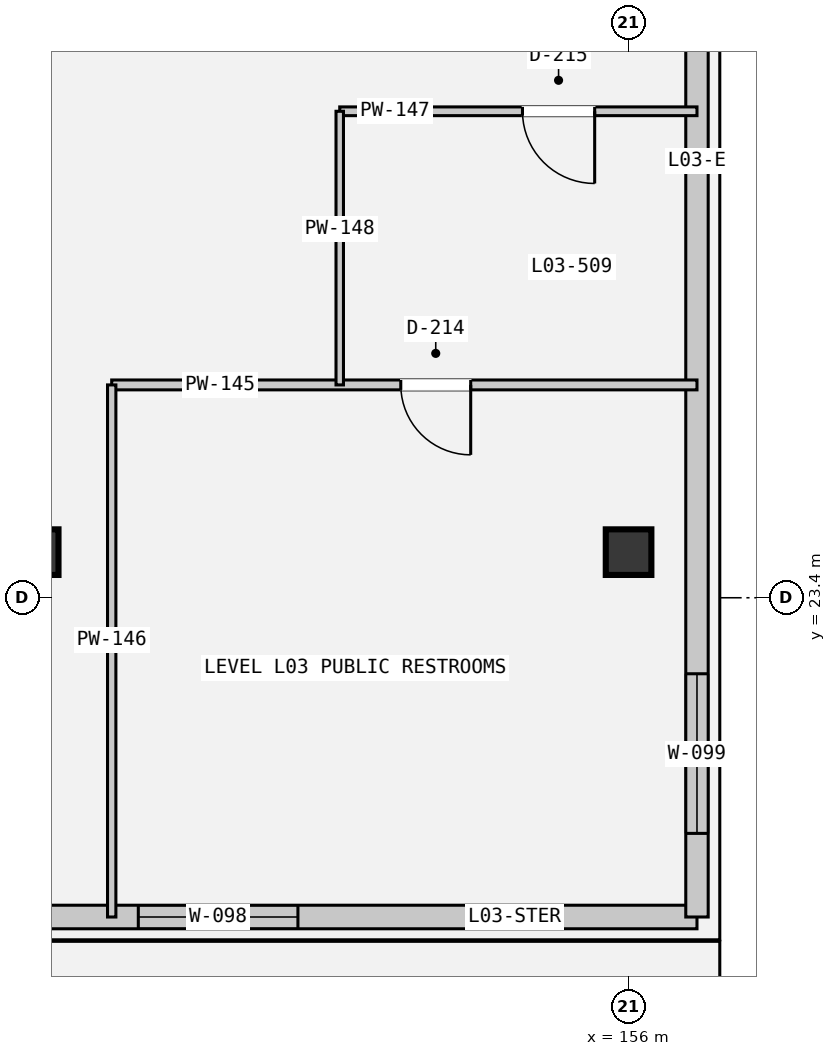
"""IFC4 building model, lengths in metres.
Left out: names, types, materials, properties, quantities, classifications, styles, units other than length and angle.
Written with IfcOpenShell. Run it as: python <this file> out.ifc"""

import sys

from ifc_helpers import new_model, si_unit, direction, frame, frame_2d, origin, origin_2d, place, context, subcontext, project, spatial, rectangle, extrude, element, fill, save


model = new_model("IFC4")
c1 = context("Model", 3, precision=1e-05, world=origin(), true_north=direction((0.0, 1.0)))
c2 = subcontext(c1, "Body", "Model", "MODEL_VIEW")
j1 = project(units=[si_unit("LENGTHUNIT", "METRE"), si_unit("PLANEANGLEUNIT", "RADIAN")], contexts=[c1])
p1 = place(None, origin())
s1 = spatial("IfcSite", under=j1, at=p1, CompositionType="ELEMENT")
p2 = place(p1, origin())
s2 = spatial("IfcBuilding", under=s1, at=p2, CompositionType="ELEMENT")
p3 = place(p2, frame((0.0, 0.0, 15.0)))
s3 = spatial("IfcBuildingStorey", under=s2, at=p3, CompositionType="ELEMENT", Elevation=15.0)
for number, where, z_axis, x_axis in (
    (1, (148.2, 24.0, 0.0), (0.0, 0.0, 1.0), (1.0, 0.0, 0.0)),
    (2, (156.0, 24.0, 0.0), (0.0, 0.0, 1.0), (1.0, 0.0, 0.0)),
):
    element("IfcColumn", number, at=place(p3, frame(where, z_axis=z_axis, x_axis=x_axis)), inside=s3, PredefinedType="COLUMN", context=c2, shape_type="SweptSolid", body=[
        extrude(rectangle(XDim=0.6, YDim=0.6, at=origin_2d()), origin(), (0.0, 0.0, 1.0), 4.8),
    ])
p4 = place(p3, frame((132.85, 19.2, 0.0), z_axis=(0.0, 0.0, 1.0), x_axis=(1.0, 0.0, 0.0)))
e3 = element("IfcWall", 3, at=p4, inside=s3, PredefinedType="SOLIDWALL", context=c2, shape_type="SweptSolid", body=[
    extrude(rectangle(XDim=24.05, YDim=0.31, at=frame_2d((12.025, 0.0))), origin(), (0.0, 0.0, 1.0), 3.87),
])
p5 = place(p4, frame((1.1, 0.0, 0.78)))
e4 = element("IfcOpeningElement", 4, at=p5, cuts=e3, PredefinedType="OPENING", context=c2, shape_type="SweptSolid", body=[
    extrude(rectangle(XDim=2.1, YDim=2.6, at=frame_2d((1.05, 1.3))), frame((0.0, 0.165, 0.0), z_axis=(0.0, -1.0, 0.0), x_axis=(1.0, 0.0, 0.0)), (0.0, 0.0, 1.0), 0.33),
])
p6 = place(p4, frame((8.9, 0.0, 0.78)))
e5 = element("IfcOpeningElement", 5, at=p6, cuts=e3, PredefinedType="OPENING", context=c2, shape_type="SweptSolid", body=[
    extrude(rectangle(XDim=2.1, YDim=2.6, at=frame_2d((1.05, 1.3))), frame((0.0, 0.165, 0.0), z_axis=(0.0, -1.0, 0.0), x_axis=(1.0, 0.0, 0.0)), (0.0, 0.0, 1.0), 0.33),
])
p7 = place(p4, frame((12.8, 0.0, 0.78)))
e6 = element("IfcOpeningElement", 6, at=p7, cuts=e3, PredefinedType="OPENING", context=c2, shape_type="SweptSolid", body=[
    extrude(rectangle(XDim=2.1, YDim=2.6, at=frame_2d((1.05, 1.3))), frame((0.0, 0.165, 0.0), z_axis=(0.0, -1.0, 0.0), x_axis=(1.0, 0.0, 0.0)), (0.0, 0.0, 1.0), 0.33),
])
p8 = place(p4, frame((16.7, 0.0, 0.78)))
e7 = element("IfcOpeningElement", 7, at=p8, cuts=e3, PredefinedType="OPENING", context=c2, shape_type="SweptSolid", body=[
    extrude(rectangle(XDim=2.1, YDim=2.6, at=frame_2d((1.05, 1.3))), frame((0.0, 0.165, 0.0), z_axis=(0.0, -1.0, 0.0), x_axis=(1.0, 0.0, 0.0)), (0.0, 0.0, 1.0), 0.33),
])
p9 = place(p3, frame((156.9, 19.2, 0.0), z_axis=(0.0, 0.0, 1.0), x_axis=(0.0, 1.0, 0.0)))
e8 = element("IfcWall", 8, at=p9, inside=s3, PredefinedType="SOLIDWALL", context=c2, shape_type="SweptSolid", body=[
    extrude(rectangle(XDim=81.9, YDim=0.295, at=frame_2d((40.95, 0.0))), origin(), (0.0, 0.0, 1.0), 3.87),
])
p10 = place(p9, frame((1.1, 0.0, 0.78)))
e9 = element("IfcOpeningElement", 9, at=p10, cuts=e8, PredefinedType="OPENING", context=c2, shape_type="SweptSolid", body=[
    extrude(rectangle(XDim=2.1, YDim=2.6, at=frame_2d((1.05, 1.3))), frame((0.0, 0.157, 0.0), z_axis=(0.0, -1.0, 0.0), x_axis=(1.0, 0.0, 0.0)), (0.0, 0.0, 1.0), 0.315),
])
p11 = place(p9, frame((16.7, 0.0, 0.78)))
e10 = element("IfcOpeningElement", 10, at=p11, cuts=e8, PredefinedType="OPENING", context=c2, shape_type="SweptSolid", body=[
    extrude(rectangle(XDim=2.1, YDim=2.6, at=frame_2d((1.05, 1.3))), frame((0.0, 0.157, 0.0), z_axis=(0.0, -1.0, 0.0), x_axis=(1.0, 0.0, 0.0)), (0.0, 0.0, 1.0), 0.315),
])
p12 = place(p9, frame((20.6, 0.0, 0.78)))
e11 = element("IfcOpeningElement", 11, at=p12, cuts=e8, PredefinedType="OPENING", context=c2, shape_type="SweptSolid", body=[
    extrude(rectangle(XDim=2.1, YDim=2.6, at=frame_2d((1.05, 1.3))), frame((0.0, 0.157, 0.0), z_axis=(0.0, -1.0, 0.0), x_axis=(1.0, 0.0, 0.0)), (0.0, 0.0, 1.0), 0.315),
])
p13 = place(p9, frame((24.5, 0.0, 0.78)))
e12 = element("IfcOpeningElement", 12, at=p13, cuts=e8, PredefinedType="OPENING", context=c2, shape_type="SweptSolid", body=[
    extrude(rectangle(XDim=2.1, YDim=2.6, at=frame_2d((1.05, 1.3))), frame((0.0, 0.157, 0.0), z_axis=(0.0, -1.0, 0.0), x_axis=(1.0, 0.0, 0.0)), (0.0, 0.0, 1.0), 0.315),
])
p14 = place(p9, frame((28.4, 0.0, 0.78)))
e13 = element("IfcOpeningElement", 13, at=p14, cuts=e8, PredefinedType="OPENING", context=c2, shape_type="SweptSolid", body=[
    extrude(rectangle(XDim=2.1, YDim=2.6, at=frame_2d((1.05, 1.3))), frame((0.0, 0.157, 0.0), z_axis=(0.0, -1.0, 0.0), x_axis=(1.0, 0.0, 0.0)), (0.0, 0.0, 1.0), 0.315),
])
p15 = place(p9, frame((36.2, 0.0, 0.78)))
e14 = element("IfcOpeningElement", 14, at=p15, cuts=e8, PredefinedType="OPENING", context=c2, shape_type="SweptSolid", body=[
    extrude(rectangle(XDim=2.1, YDim=2.6, at=frame_2d((1.05, 1.3))), frame((0.0, 0.157, 0.0), z_axis=(0.0, -1.0, 0.0), x_axis=(1.0, 0.0, 0.0)), (0.0, 0.0, 1.0), 0.315),
])
p16 = place(p9, frame((40.1, 0.0, 0.78)))
e15 = element("IfcOpeningElement", 15, at=p16, cuts=e8, PredefinedType="OPENING", context=c2, shape_type="SweptSolid", body=[
    extrude(rectangle(XDim=2.1, YDim=2.6, at=frame_2d((1.05, 1.3))), frame((0.0, 0.157, 0.0), z_axis=(0.0, -1.0, 0.0), x_axis=(1.0, 0.0, 0.0)), (0.0, 0.0, 1.0), 0.315),
])
p17 = place(p9, frame((44.0, 0.0, 0.78)))
e16 = element("IfcOpeningElement", 16, at=p17, cuts=e8, PredefinedType="OPENING", context=c2, shape_type="SweptSolid", body=[
    extrude(rectangle(XDim=2.1, YDim=2.6, at=frame_2d((1.05, 1.3))), frame((0.0, 0.157, 0.0), z_axis=(0.0, -1.0, 0.0), x_axis=(1.0, 0.0, 0.0)), (0.0, 0.0, 1.0), 0.315),
])
p18 = place(p9, frame((47.9, 0.0, 0.78)))
e17 = element("IfcOpeningElement", 17, at=p18, cuts=e8, PredefinedType="OPENING", context=c2, shape_type="SweptSolid", body=[
    extrude(rectangle(XDim=2.1, YDim=2.6, at=frame_2d((1.05, 1.3))), frame((0.0, 0.157, 0.0), z_axis=(0.0, -1.0, 0.0), x_axis=(1.0, 0.0, 0.0)), (0.0, 0.0, 1.0), 0.315),
])
p19 = place(p9, frame((51.8, 0.0, 0.78)))
e18 = element("IfcOpeningElement", 18, at=p19, cuts=e8, PredefinedType="OPENING", context=c2, shape_type="SweptSolid", body=[
    extrude(rectangle(XDim=2.1, YDim=2.6, at=frame_2d((1.05, 1.3))), frame((0.0, 0.157, 0.0), z_axis=(0.0, -1.0, 0.0), x_axis=(1.0, 0.0, 0.0)), (0.0, 0.0, 1.0), 0.315),
])
p20 = place(p9, frame((59.6, 0.0, 0.78)))
e19 = element("IfcOpeningElement", 19, at=p20, cuts=e8, PredefinedType="OPENING", context=c2, shape_type="SweptSolid", body=[
    extrude(rectangle(XDim=2.1, YDim=2.6, at=frame_2d((1.05, 1.3))), frame((0.0, 0.157, 0.0), z_axis=(0.0, -1.0, 0.0), x_axis=(1.0, 0.0, 0.0)), (0.0, 0.0, 1.0), 0.315),
])
p21 = place(p9, frame((63.5, 0.0, 0.78)))
e20 = element("IfcOpeningElement", 20, at=p21, cuts=e8, PredefinedType="OPENING", context=c2, shape_type="SweptSolid", body=[
    extrude(rectangle(XDim=2.1, YDim=2.6, at=frame_2d((1.05, 1.3))), frame((0.0, 0.157, 0.0), z_axis=(0.0, -1.0, 0.0), x_axis=(1.0, 0.0, 0.0)), (0.0, 0.0, 1.0), 0.315),
])
p22 = place(p9, frame((67.4, 0.0, 0.78)))
e21 = element("IfcOpeningElement", 21, at=p22, cuts=e8, PredefinedType="OPENING", context=c2, shape_type="SweptSolid", body=[
    extrude(rectangle(XDim=2.1, YDim=2.6, at=frame_2d((1.05, 1.3))), frame((0.0, 0.157, 0.0), z_axis=(0.0, -1.0, 0.0), x_axis=(1.0, 0.0, 0.0)), (0.0, 0.0, 1.0), 0.315),
])
p23 = place(p9, frame((71.3, 0.0, 0.78)))
e22 = element("IfcOpeningElement", 22, at=p23, cuts=e8, PredefinedType="OPENING", context=c2, shape_type="SweptSolid", body=[
    extrude(rectangle(XDim=2.1, YDim=2.6, at=frame_2d((1.05, 1.3))), frame((0.0, 0.157, 0.0), z_axis=(0.0, -1.0, 0.0), x_axis=(1.0, 0.0, 0.0)), (0.0, 0.0, 1.0), 0.315),
])
p24 = place(p9, frame((75.2, 0.0, 0.78)))
e23 = element("IfcOpeningElement", 23, at=p24, cuts=e8, PredefinedType="OPENING", context=c2, shape_type="SweptSolid", body=[
    extrude(rectangle(XDim=2.1, YDim=2.6, at=frame_2d((1.05, 1.3))), frame((0.0, 0.157, 0.0), z_axis=(0.0, -1.0, 0.0), x_axis=(1.0, 0.0, 0.0)), (0.0, 0.0, 1.0), 0.315),
])
p25 = place(p3, frame((156.9, 26.2, 0.0), z_axis=(0.0, 0.0, 1.0), x_axis=(-1.0, 0.0, 0.0)))
e24 = element("IfcWall", 24, at=p25, inside=s3, PredefinedType="PARTITIONING", context=c2, shape_type="SweptSolid", body=[
    extrude(rectangle(XDim=7.7, YDim=0.13, at=frame_2d((3.85, 0.0))), origin(), (0.0, 0.0, 1.0), 3.45),
])
p26 = place(p25, frame((2.977, 0.0, 0.0)))
e25 = element("IfcOpeningElement", 25, at=p26, cuts=e24, PredefinedType="OPENING", context=c2, shape_type="SweptSolid", body=[
    extrude(rectangle(XDim=0.92, YDim=2.1, at=frame_2d((0.46, 1.05))), frame((0.0, 0.075, 0.0), z_axis=(0.0, -1.0, 0.0), x_axis=(1.0, 0.0, 0.0)), (0.0, 0.0, 1.0), 0.15),
])
p27 = place(p3, frame((149.2, 26.2, 0.0), z_axis=(0.0, 0.0, 1.0), x_axis=(0.0, -1.0, 0.0)))
e26 = element("IfcWall", 26, at=p27, inside=s3, PredefinedType="PARTITIONING", context=c2, shape_type="SweptSolid", body=[
    extrude(rectangle(XDim=7.0, YDim=0.11, at=frame_2d((3.5, 0.0))), origin(), (0.0, 0.0, 1.0), 3.45),
])
p28 = place(p3, frame((156.9, 29.8, 0.0), z_axis=(0.0, 0.0, 1.0), x_axis=(-1.0, 0.0, 0.0)))
e27 = element("IfcWall", 27, at=p28, inside=s3, PredefinedType="PARTITIONING", context=c2, shape_type="SweptSolid", body=[
    extrude(rectangle(XDim=4.7, YDim=0.115, at=frame_2d((2.35, 0.0))), origin(), (0.0, 0.0, 1.0), 3.45),
])
p29 = place(p28, frame((1.346, 0.0, 0.0)))
e28 = element("IfcOpeningElement", 28, at=p29, cuts=e27, PredefinedType="OPENING", context=c2, shape_type="SweptSolid", body=[
    extrude(rectangle(XDim=0.95, YDim=2.1, at=frame_2d((0.475, 1.05))), frame((0.0, 0.067, 0.0), z_axis=(0.0, -1.0, 0.0), x_axis=(1.0, 0.0, 0.0)), (0.0, 0.0, 1.0), 0.135),
])
p30 = place(p3, frame((152.2, 29.8, 0.0), z_axis=(0.0, 0.0, 1.0), x_axis=(0.0, -1.0, 0.0)))
e29 = element("IfcWall", 29, at=p30, inside=s3, PredefinedType="PARTITIONING", context=c2, shape_type="SweptSolid", body=[
    extrude(rectangle(XDim=3.6, YDim=0.098, at=frame_2d((1.8, 0.0))), origin(), (0.0, 0.0, 1.0), 3.45),
])
p31 = place(p8, origin())
e30 = element("IfcWindow", 30, at=p31, inside=s3, PartitioningType="SINGLE_PANEL", PredefinedType="WINDOW", context=c2, shape_type="SweptSolid", body=[
    extrude(rectangle(XDim=2.1, YDim=2.6, at=frame_2d((1.05, 1.3))), frame((0.0, 0.03, 0.0), z_axis=(0.0, -1.0, 0.0), x_axis=(1.0, 0.0, 0.0)), (0.0, 0.0, 1.0), 0.06),
])
fill(e7, e30)
p32 = place(p10, origin())
e31 = element("IfcWindow", 31, at=p32, inside=s3, PartitioningType="SINGLE_PANEL", PredefinedType="WINDOW", context=c2, shape_type="SweptSolid", body=[
    extrude(rectangle(XDim=2.1, YDim=2.6, at=frame_2d((1.05, 1.3))), frame((0.0, 0.03, 0.0), z_axis=(0.0, -1.0, 0.0), x_axis=(1.0, 0.0, 0.0)), (0.0, 0.0, 1.0), 0.06),
])
fill(e9, e31)
p33 = place(p26, origin())
e32 = element("IfcDoor", 32, at=p33, inside=s3, OperationType="SINGLE_SWING_LEFT", PredefinedType="DOOR", context=c2, shape_type="SweptSolid", body=[
    extrude(rectangle(XDim=0.92, YDim=2.1, at=frame_2d((0.46, 1.05))), frame((0.0, 0.025, 0.0), z_axis=(0.0, -1.0, 0.0), x_axis=(1.0, 0.0, 0.0)), (0.0, 0.0, 1.0), 0.05),
])
fill(e25, e32)
p34 = place(p29, origin())
e33 = element("IfcDoor", 33, at=p34, inside=s3, OperationType="SINGLE_SWING_RIGHT", PredefinedType="DOOR", context=c2, shape_type="SweptSolid", body=[
    extrude(rectangle(XDim=0.95, YDim=2.1, at=frame_2d((0.475, 1.05))), frame((0.0, 0.025, 0.0), z_axis=(0.0, -1.0, 0.0), x_axis=(1.0, 0.0, 0.0)), (0.0, 0.0, 1.0), 0.05),
])
fill(e28, e33)
save(model, sys.argv[1])
